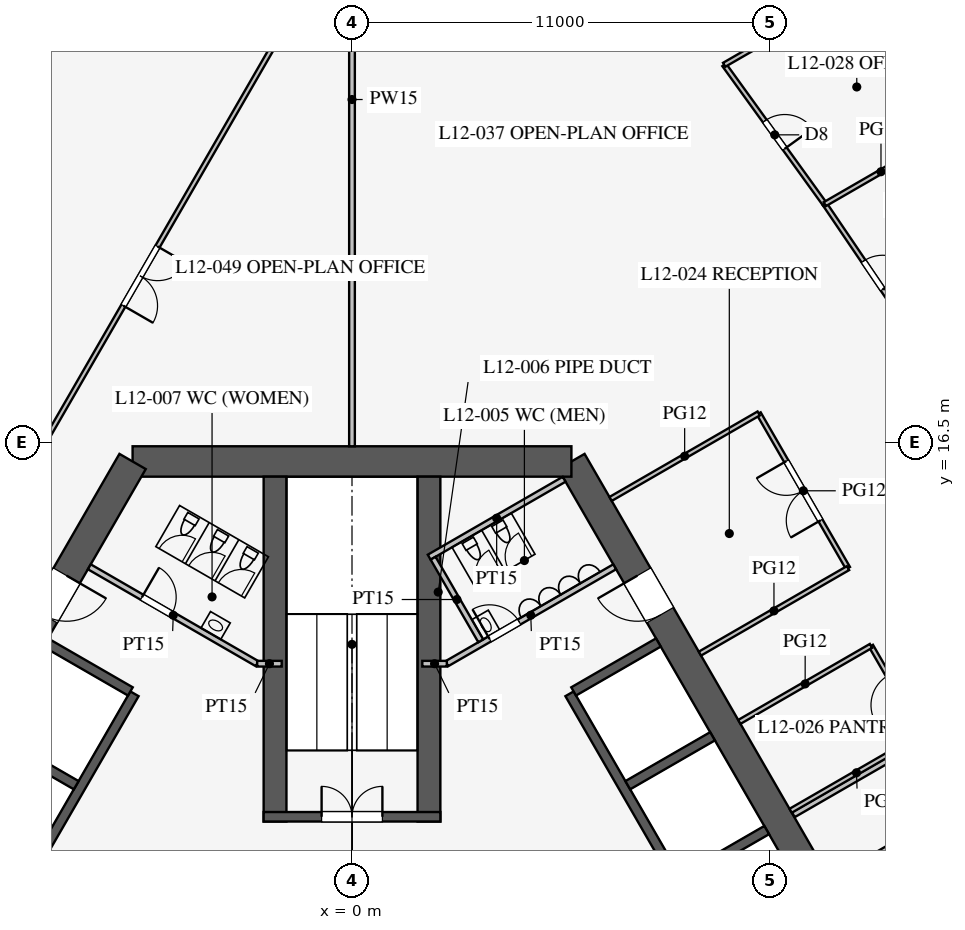
"""IFC4 building model, lengths in metres.
Left out: names, types, materials, properties, quantities, classifications, styles, units other than length and angle.
Written with IfcOpenShell. Run it as: python <this file> out.ifc"""

import sys

from ifc_helpers import new_model, si_unit, direction, frame, frame_2d, origin, place, context, subcontext, project, spatial, rectangle, extrude, element, fill, save


model = new_model("IFC4")
c1 = context("Model", 3, precision=1e-05, world=origin(), true_north=direction((0.0, 1.0)))
c2 = subcontext(c1, "Body", "Model", "MODEL_VIEW")
j1 = project(units=[si_unit("LENGTHUNIT", "METRE"), si_unit("PLANEANGLEUNIT", "RADIAN")], contexts=[c1])
p1 = place(None, origin())
s1 = spatial("IfcSite", under=j1, at=p1, CompositionType="ELEMENT")
p2 = place(p1, origin())
s2 = spatial("IfcBuilding", under=s1, at=p2, CompositionType="ELEMENT")
p3 = place(p2, frame((0.0, 0.0, 54.3)))
s3 = spatial("IfcBuildingStorey", under=s2, at=p3, CompositionType="ELEMENT", Elevation=54.3)
p4 = place(p3, frame((16.743, -3.0, 0.0), z_axis=(0.0, 0.0, 1.0), x_axis=(-0.500002442456, 0.866023993627, 0.0)))
e1 = element("IfcWall", 1, at=p4, inside=s3, PredefinedType="SHEAR", context=c2, shape_type="SweptSolid", body=[
    extrude(rectangle(XDim=21.939, YDim=0.8, at=frame_2d((10.97, 0.0))), origin(), (0.0, 0.0, 1.0), 4.2),
])
p5 = place(p4, frame((17.27, 0.0, 0.0)))
e2 = element("IfcOpeningElement", 2, at=p5, cuts=e1, PredefinedType="OPENING", context=c2, shape_type="SweptSolid", body=[
    extrude(rectangle(XDim=1.2, YDim=2.1, at=frame_2d((0.6, 1.05))), frame((0.0, 0.41, 0.0), z_axis=(0.0, -1.0, 0.0), x_axis=(1.0, 0.0, 0.0)), (0.0, 0.0, 1.0), 0.82),
])
p6 = place(p4, frame((3.47, 0.0, 0.0)))
e3 = element("IfcOpeningElement", 3, at=p6, cuts=e1, PredefinedType="OPENING", context=c2, shape_type="SweptSolid", body=[
    extrude(rectangle(XDim=1.2, YDim=2.1, at=frame_2d((0.6, 1.05))), frame((0.0, 0.41, 0.0), z_axis=(0.0, -1.0, 0.0), x_axis=(1.0, 0.0, 0.0)), (0.0, 0.0, 1.0), 0.82),
])
p7 = place(p3, frame((5.773, 16.0, 0.0), z_axis=(0.0, 0.0, 1.0), x_axis=(-1.0, 0.0, 0.0)))
e4 = element("IfcWall", 4, at=p7, inside=s3, PredefinedType="SHEAR", context=c2, shape_type="SweptSolid", body=[
    extrude(rectangle(XDim=11.547, YDim=0.8, at=frame_2d((5.773, 0.0))), origin(), (0.0, 0.0, 1.0), 4.2),
])
p8 = place(p3, frame((-5.773, 16.0, 0.0), z_axis=(0.0, 0.0, 1.0), x_axis=(-0.500002442456, -0.866023993627, 0.0)))
e5 = element("IfcWall", 5, at=p8, inside=s3, PredefinedType="SHEAR", context=c2, shape_type="SweptSolid", body=[
    extrude(rectangle(XDim=21.939, YDim=0.8, at=frame_2d((10.97, 0.0))), origin(), (0.0, 0.0, 1.0), 4.2),
])
p9 = place(p8, frame((17.27, 0.0, 0.0)))
e6 = element("IfcOpeningElement", 6, at=p9, cuts=e5, PredefinedType="OPENING", context=c2, shape_type="SweptSolid", body=[
    extrude(rectangle(XDim=1.2, YDim=2.1, at=frame_2d((0.6, 1.05))), frame((0.0, 0.41, 0.0), z_axis=(0.0, -1.0, 0.0), x_axis=(1.0, 0.0, 0.0)), (0.0, 0.0, 1.0), 0.82),
])
p10 = place(p8, frame((3.47, 0.0, 0.0)))
e7 = element("IfcOpeningElement", 7, at=p10, cuts=e5, PredefinedType="OPENING", context=c2, shape_type="SweptSolid", body=[
    extrude(rectangle(XDim=1.2, YDim=2.1, at=frame_2d((0.6, 1.05))), frame((0.0, 0.41, 0.0), z_axis=(0.0, -1.0, 0.0), x_axis=(1.0, 0.0, 0.0)), (0.0, 0.0, 1.0), 0.82),
])
p11 = place(p3, frame((11.424, 0.014, 0.0), z_axis=(0.0, 0.0, 1.0), x_axis=(-0.500001763848, 0.866024385424, 0.0)))
e8 = element("IfcWall", 8, at=p11, inside=s3, PredefinedType="SHEAR", context=c2, shape_type="SweptSolid", body=[
    extrude(rectangle(XDim=11.4, YDim=0.25, at=frame_2d((5.7, 0.0))), origin(), (0.0, 0.0, 1.0), 4.2),
])
for number, where, z_axis, x_axis in (
    (9, (8.682, 5.012, 0.0), (0.0, 0.0, 1.0), (0.866, 0.5, 0.0)),
    (10, (7.257, 7.481, 0.0), (0.0, 0.0, 1.0), (0.866, 0.5, 0.0)),
):
    element("IfcWall", number, at=place(p3, frame(where, z_axis=z_axis, x_axis=x_axis)), inside=s3, PredefinedType="SHEAR", context=c2, shape_type="SweptSolid", body=[
        extrude(rectangle(XDim=2.575, YDim=0.25, at=frame_2d((1.288, 0.0))), origin(), (0.0, 0.0, 1.0), 4.2),
    ])
p12 = place(p3, frame((5.832, 9.949, 0.0), z_axis=(0.0, 0.0, 1.0), x_axis=(0.866029291668, 0.499993265928, 0.0)))
e11 = element("IfcWall", 11, at=p12, inside=s3, PredefinedType="SHEAR", context=c2, shape_type="SweptSolid", body=[
    extrude(rectangle(XDim=2.575, YDim=0.25, at=frame_2d((1.288, 0.0))), origin(), (0.0, 0.0, 1.0), 4.2),
])
p13 = place(p3, frame((-5.724, 9.886, 0.0), z_axis=(0.0, 0.0, 1.0), x_axis=(-0.500001763848, -0.866024385424, 0.0)))
e12 = element("IfcWall", 12, at=p13, inside=s3, PredefinedType="SHEAR", context=c2, shape_type="SweptSolid", body=[
    extrude(rectangle(XDim=11.4, YDim=0.25, at=frame_2d((5.7, 0.0))), origin(), (0.0, 0.0, 1.0), 4.2),
])
p14 = place(p13, frame((6.525, 0.0, 0.0)))
e13 = element("IfcOpeningElement", 13, at=p14, cuts=e12, PredefinedType="OPENING", context=c2, shape_type="SweptSolid", body=[
    extrude(rectangle(XDim=1.2, YDim=2.2, at=frame_2d((0.6, 1.1))), frame((0.0, 0.135, 0.0), z_axis=(0.0, -1.0, 0.0), x_axis=(1.0, 0.0, 0.0)), (0.0, 0.0, 1.0), 0.27),
])
p15 = place(p13, frame((9.375, 0.0, 0.0)))
e14 = element("IfcOpeningElement", 14, at=p15, cuts=e12, PredefinedType="OPENING", context=c2, shape_type="SweptSolid", body=[
    extrude(rectangle(XDim=1.2, YDim=2.2, at=frame_2d((0.6, 1.1))), frame((0.0, 0.135, 0.0), z_axis=(0.0, -1.0, 0.0), x_axis=(1.0, 0.0, 0.0)), (0.0, 0.0, 1.0), 0.27),
])
p16 = place(p3, frame((-5.832, 9.949, 0.0), z_axis=(0.0, 0.0, 1.0), x_axis=(-0.866029291668, 0.499993265928, 0.0)))
e15 = element("IfcWall", 15, at=p16, inside=s3, PredefinedType="SHEAR", context=c2, shape_type="SweptSolid", body=[
    extrude(rectangle(XDim=2.575, YDim=0.25, at=frame_2d((1.288, 0.0))), origin(), (0.0, 0.0, 1.0), 4.2),
])
p17 = place(p3, frame((-7.257, 7.481, 0.0), z_axis=(0.0, 0.0, 1.0), x_axis=(-0.866046643894, 0.499963209246, 0.0)))
e16 = element("IfcWall", 16, at=p17, inside=s3, PredefinedType="SHEAR", context=c2, shape_type="SweptSolid", body=[
    extrude(rectangle(XDim=2.575, YDim=0.25, at=frame_2d((1.288, 0.0))), origin(), (0.0, 0.0, 1.0), 4.2),
])
for number, where, z_axis, x_axis in (
    (17, (2.025, 6.525, 0.0), (0.0, 0.0, 1.0), (0.0, 1.0, 0.0)),
    (18, (-2.025, 6.525, 0.0), (0.0, 0.0, 1.0), (0.0, 1.0, 0.0)),
):
    element("IfcWall", number, at=place(p3, frame(where, z_axis=z_axis, x_axis=x_axis)), inside=s3, PredefinedType="SHEAR", context=c2, shape_type="SweptSolid", body=[
        extrude(rectangle(XDim=9.075, YDim=0.6, at=frame_2d((4.538, 0.0))), origin(), (0.0, 0.0, 1.0), 4.2),
    ])
p18 = place(p3, frame((2.325, 6.65, 0.0), z_axis=(0.0, 0.0, 1.0), x_axis=(-1.0, 0.0, 0.0)))
e19 = element("IfcWall", 19, at=p18, inside=s3, PredefinedType="SHEAR", context=c2, shape_type="SweptSolid", body=[
    extrude(rectangle(XDim=4.65, YDim=0.25, at=frame_2d((2.325, 0.0))), origin(), (0.0, 0.0, 1.0), 4.2),
])
p19 = place(p18, frame((1.525, 0.0, 0.0)))
e20 = element("IfcOpeningElement", 20, at=p19, cuts=e19, PredefinedType="OPENING", context=c2, shape_type="SweptSolid", body=[
    extrude(rectangle(XDim=1.6, YDim=2.1, at=frame_2d((0.8, 1.05))), frame((0.0, 0.135, 0.0), z_axis=(0.0, -1.0, 0.0), x_axis=(1.0, 0.0, 0.0)), (0.0, 0.0, 1.0), 0.27),
])
p20 = place(p3, frame((2.495, 10.678, 0.0), z_axis=(0.0, 0.0, 1.0), x_axis=(0.86602216432, 0.500005610874, 0.0)))
e21 = element("IfcWall", 21, at=p20, inside=s3, PredefinedType="PARTITIONING", context=c2, shape_type="SweptSolid", body=[
    extrude(rectangle(XDim=5.1, YDim=0.15, at=frame_2d((2.55, 0.0))), origin(), (0.0, 0.0, 1.0), 4.0),
])
p21 = place(p20, frame((1.3, 0.0, 0.0)))
e22 = element("IfcOpeningElement", 22, at=p21, cuts=e21, PredefinedType="OPENING", context=c2, shape_type="SweptSolid", body=[
    extrude(rectangle(XDim=0.9, YDim=2.1, at=frame_2d((0.45, 1.05))), frame((0.0, 0.085, 0.0), z_axis=(0.0, -1.0, 0.0), x_axis=(1.0, 0.0, 0.0)), (0.0, 0.0, 1.0), 0.17),
])
p22 = place(p3, frame((-2.495, 10.678, 0.0), z_axis=(0.0, 0.0, 1.0), x_axis=(-0.86602216432, 0.500005610874, 0.0)))
e23 = element("IfcWall", 23, at=p22, inside=s3, PredefinedType="PARTITIONING", context=c2, shape_type="SweptSolid", body=[
    extrude(rectangle(XDim=5.1, YDim=0.15, at=frame_2d((2.55, 0.0))), origin(), (0.0, 0.0, 1.0), 4.0),
])
p23 = place(p22, frame((2.6, 0.0, 0.0)))
e24 = element("IfcOpeningElement", 24, at=p23, cuts=e23, PredefinedType="OPENING", context=c2, shape_type="SweptSolid", body=[
    extrude(rectangle(XDim=0.9, YDim=2.1, at=frame_2d((0.45, 1.05))), frame((0.0, 0.085, 0.0), z_axis=(0.0, -1.0, 0.0), x_axis=(1.0, 0.0, 0.0)), (0.0, 0.0, 1.0), 0.17),
])
for number, where, z_axis, x_axis in (
    (25, (2.495, 10.678, 0.0), (0.0, 0.0, 1.0), (-1.0, 0.0, 0.0)),
    (26, (-2.495, 10.678, 0.0), (0.0, 0.0, 1.0), (1.0, 0.0, 0.0)),
):
    element("IfcWall", number, at=place(p3, frame(where, z_axis=z_axis, x_axis=x_axis)), inside=s3, PredefinedType="PARTITIONING", context=c2, shape_type="SweptSolid", body=[
        extrude(rectangle(XDim=0.645, YDim=0.15, at=frame_2d((0.323, 0.0))), origin(), (0.0, 0.0, 1.0), 4.0),
    ])
p24 = place(p3, frame((2.031, 13.482, 0.0), z_axis=(0.0, 0.0, 1.0), x_axis=(0.866050731258, 0.499956128963, 0.0)))
e27 = element("IfcWall", 27, at=p24, inside=s3, PredefinedType="PARTITIONING", context=c2, shape_type="SweptSolid", body=[
    extrude(rectangle(XDim=4.1, YDim=0.15, at=frame_2d((2.05, 0.0))), origin(), (0.0, 0.0, 1.0), 4.0),
])
p25 = place(p3, frame((3.389, 11.281, 0.0), z_axis=(0.0, 0.0, 1.0), x_axis=(-0.499989096993, 0.866031698547, 0.0)))
e28 = element("IfcWall", 28, at=p25, inside=s3, PredefinedType="PARTITIONING", context=c2, shape_type="SweptSolid", body=[
    extrude(rectangle(XDim=2.51, YDim=0.15, at=frame_2d((1.255, 0.0))), origin(), (0.0, 0.0, 1.0), 4.0),
])
p26 = place(p3, frame((0.0, 16.4, 0.0), z_axis=(0.0, 0.0, 1.0), x_axis=(0.0, 1.0, 0.0)))
e29 = element("IfcWall", 29, at=p26, inside=s3, PredefinedType="PARTITIONING", context=c2, shape_type="SweptSolid", body=[
    extrude(rectangle(XDim=18.25, YDim=0.15, at=frame_2d((9.125, 0.0))), origin(), (0.0, 0.0, 1.0), 2.3),
])
p27 = place(p3, frame((11.613, 6.705, 0.0), z_axis=(0.0, 0.0, 1.0), x_axis=(0.86602785495, 0.499995754432, 0.0)))
e30 = element("IfcWall", 30, at=p27, inside=s3, PredefinedType="PARTITIONING", context=c2, shape_type="SweptSolid", body=[
    extrude(rectangle(XDim=12.759, YDim=0.15, at=frame_2d((6.379, 0.0))), origin(), (0.0, 0.0, 1.0), 3.2),
])
p28 = place(p3, frame((15.006, 8.808, 0.0), z_axis=(0.0, 0.0, 1.0), x_axis=(-0.500048589285, 0.86599734893, 0.0)))
e31 = element("IfcWall", 31, at=p28, inside=s3, PredefinedType="PARTITIONING", context=c2, shape_type="SweptSolid", body=[
    extrude(rectangle(XDim=2.7, YDim=0.12, at=frame_2d((1.35, 0.0))), origin(), (0.0, 0.0, 1.0), 2.9),
])
p29 = place(p28, frame((0.9, 0.0, 0.15)))
e32 = element("IfcOpeningElement", 32, at=p29, cuts=e31, PredefinedType="OPENING", context=c2, shape_type="SweptSolid", body=[
    extrude(rectangle(XDim=0.9, YDim=2.1, at=frame_2d((0.45, 1.05))), frame((0.0, 0.07, 0.0), z_axis=(0.0, -1.0, 0.0), x_axis=(1.0, 0.0, 0.0)), (0.0, 0.0, 1.0), 0.14),
])
p30 = place(p3, frame((13.052, 13.194, 0.0), z_axis=(0.0, 0.0, 1.0), x_axis=(-0.499977259774, 0.866038532462, 0.0)))
e33 = element("IfcWall", 33, at=p30, inside=s3, PredefinedType="PARTITIONING", context=c2, shape_type="SweptSolid", body=[
    extrude(rectangle(XDim=4.7, YDim=0.12, at=frame_2d((2.35, 0.0))), origin(), (0.0, 0.0, 1.0), 2.9),
])
p31 = place(p30, frame((1.45, 0.0, 0.15)))
e34 = element("IfcOpeningElement", 34, at=p31, cuts=e33, PredefinedType="OPENING", context=c2, shape_type="SweptSolid", body=[
    extrude(rectangle(XDim=1.8, YDim=2.1, at=frame_2d((0.9, 1.05))), frame((0.0, 0.07, 0.0), z_axis=(0.0, -1.0, 0.0), x_axis=(1.0, 0.0, 0.0)), (0.0, 0.0, 1.0), 0.14),
])
for number, where, z_axis, x_axis in (
    (35, (11.542, 6.808, 0.0), (0.0, 0.0, 1.0), (0.866, 0.5, 0.0)),
    (36, (10.192, 9.146, 0.0), (0.0, 0.0, 1.0), (0.866, 0.5, 0.0)),
):
    element("IfcWall", number, at=place(p3, frame(where, z_axis=z_axis, x_axis=x_axis)), inside=s3, PredefinedType="PARTITIONING", context=c2, shape_type="SweptSolid", body=[
        extrude(rectangle(XDim=4.0, YDim=0.12, at=frame_2d((2.0, 0.0))), origin(), (0.0, 0.0, 1.0), 2.9),
    ])
p32 = place(p3, frame((9.155, 10.944, 0.0), z_axis=(0.0, 0.0, 1.0), x_axis=(0.866017533419, 0.500013631625, 0.0)))
e37 = element("IfcWall", 37, at=p32, inside=s3, PredefinedType="PARTITIONING", context=c2, shape_type="SweptSolid", body=[
    extrude(rectangle(XDim=4.5, YDim=0.12, at=frame_2d((2.25, 0.0))), origin(), (0.0, 0.0, 1.0), 2.9),
])
p33 = place(p3, frame((6.805, 15.014, 0.0), z_axis=(0.0, 0.0, 1.0), x_axis=(0.866031096941, 0.499990139034, 0.0)))
e38 = element("IfcWall", 38, at=p33, inside=s3, PredefinedType="PARTITIONING", context=c2, shape_type="SweptSolid", body=[
    extrude(rectangle(XDim=4.5, YDim=0.12, at=frame_2d((2.25, 0.0))), origin(), (0.0, 0.0, 1.0), 2.9),
])
p34 = place(p3, frame((12.605, 4.968, 0.0), z_axis=(0.0, 0.0, 1.0), x_axis=(0.866026010844, 0.49999894854, 0.0)))
e39 = element("IfcWall", 39, at=p34, inside=s3, PredefinedType="PARTITIONING", context=c2, shape_type="SweptSolid", body=[
    extrude(rectangle(XDim=4.0, YDim=0.12, at=frame_2d((2.0, 0.0))), origin(), (0.0, 0.0, 1.0), 2.9),
])
p35 = place(p3, frame((12.441, 22.771, 0.0), z_axis=(0.0, 0.0, 1.0), x_axis=(-0.585376255171, 0.810761765183, 0.0)))
e40 = element("IfcWall", 40, at=p35, inside=s3, PredefinedType="PARTITIONING", context=c2, shape_type="SweptSolid", body=[
    extrude(rectangle(XDim=4.523, YDim=0.12, at=frame_2d((2.262, 0.0))), origin(), (0.0, 0.0, 1.0), 2.9),
])
p36 = place(p35, frame((1.8, 0.0, 0.15)))
e41 = element("IfcOpeningElement", 41, at=p36, cuts=e40, PredefinedType="OPENING", context=c2, shape_type="SweptSolid", body=[
    extrude(rectangle(XDim=0.9, YDim=2.1, at=frame_2d((0.45, 1.05))), frame((0.0, 0.07, 0.0), z_axis=(0.0, -1.0, 0.0), x_axis=(1.0, 0.0, 0.0)), (0.0, 0.0, 1.0), 0.14),
])
p37 = place(p3, frame((14.975, 19.038, 0.0), z_axis=(0.0, 0.0, 1.0), x_axis=(-0.561512004239, 0.827468591002, 0.0)))
e42 = element("IfcWall", 42, at=p37, inside=s3, PredefinedType="PARTITIONING", context=c2, shape_type="SweptSolid", body=[
    extrude(rectangle(XDim=4.512, YDim=0.12, at=frame_2d((2.256, 0.0))), origin(), (0.0, 0.0, 1.0), 2.9),
])
p38 = place(p37, frame((1.8, 0.0, 0.15)))
e43 = element("IfcOpeningElement", 43, at=p38, cuts=e42, PredefinedType="OPENING", context=c2, shape_type="SweptSolid", body=[
    extrude(rectangle(XDim=0.9, YDim=2.1, at=frame_2d((0.45, 1.05))), frame((0.0, 0.07, 0.0), z_axis=(0.0, -1.0, 0.0), x_axis=(1.0, 0.0, 0.0)), (0.0, 0.0, 1.0), 0.14),
])
p39 = place(p3, frame((12.441, 22.771, 0.0), z_axis=(0.0, 0.0, 1.0), x_axis=(0.866016478054, 0.500015459501, 0.0)))
e44 = element("IfcWall", 44, at=p39, inside=s3, PredefinedType="PARTITIONING", context=c2, shape_type="SweptSolid", body=[
    extrude(rectangle(XDim=3.414, YDim=0.12, at=frame_2d((1.707, 0.0))), origin(), (0.0, 0.0, 1.0), 2.9),
])
p40 = place(p3, frame((9.793, 26.439, 0.0), z_axis=(0.0, 0.0, 1.0), x_axis=(0.866040105854, 0.499974534403, 0.0)))
e45 = element("IfcWall", 45, at=p40, inside=s3, PredefinedType="PARTITIONING", context=c2, shape_type="SweptSolid", body=[
    extrude(rectangle(XDim=3.409, YDim=0.12, at=frame_2d((1.705, 0.0))), origin(), (0.0, 0.0, 1.0), 2.9),
])
p41 = place(p3, frame((-0.016, 30.491, 0.0), z_axis=(0.0, 0.0, 1.0), x_axis=(-0.50000091641, -0.866024874695, 0.0)))
e46 = element("IfcWall", 46, at=p41, inside=s3, PredefinedType="PARTITIONING", context=c2, shape_type="SweptSolid", body=[
    extrude(rectangle(XDim=52.796, YDim=0.12, at=frame_2d((26.398, 0.0))), origin(), (0.0, 0.0, 1.0), 2.9),
])
p42 = place(p41, frame((10.2, 0.0, 0.15)))
e47 = element("IfcOpeningElement", 47, at=p42, cuts=e46, PredefinedType="OPENING", context=c2, shape_type="SweptSolid", body=[
    extrude(rectangle(XDim=1.8, YDim=2.1, at=frame_2d((0.9, 1.05))), frame((0.0, 0.07, 0.0), z_axis=(0.0, -1.0, 0.0), x_axis=(1.0, 0.0, 0.0)), (0.0, 0.0, 1.0), 0.14),
])
p43 = place(p41, frame((40.8, 0.0, 0.15)))
e48 = element("IfcOpeningElement", 48, at=p43, cuts=e46, PredefinedType="OPENING", context=c2, shape_type="SweptSolid", body=[
    extrude(rectangle(XDim=1.8, YDim=2.1, at=frame_2d((0.9, 1.05))), frame((0.0, 0.07, 0.0), z_axis=(0.0, -1.0, 0.0), x_axis=(1.0, 0.0, 0.0)), (0.0, 0.0, 1.0), 0.14),
])
p44 = place(p21, origin())
e49 = element("IfcDoor", 49, at=p44, inside=s3, OperationType="SINGLE_SWING_LEFT", PredefinedType="DOOR", context=c2, shape_type="SweptSolid", body=[
    extrude(rectangle(XDim=0.9, YDim=2.1, at=frame_2d((0.45, 1.05))), frame((0.0, 0.025, 0.0), z_axis=(0.0, -1.0, 0.0), x_axis=(1.0, 0.0, 0.0)), (0.0, 0.0, 1.0), 0.05),
])
fill(e22, e49)
p45 = place(p23, frame((0.9, 0.0, 0.0), z_axis=(0.0, 0.0, 1.0), x_axis=(-1.0, 0.0, 0.0)))
e50 = element("IfcDoor", 50, at=p45, inside=s3, OperationType="SINGLE_SWING_LEFT", PredefinedType="DOOR", context=c2, shape_type="SweptSolid", body=[
    extrude(rectangle(XDim=0.9, YDim=2.1, at=frame_2d((0.45, 1.05))), frame((0.0, 0.025, 0.0), z_axis=(0.0, -1.0, 0.0), x_axis=(1.0, 0.0, 0.0)), (0.0, 0.0, 1.0), 0.05),
])
fill(e24, e50)
p46 = place(p19, frame((1.6, 0.0, 0.0), z_axis=(0.0, 0.0, 1.0), x_axis=(-1.0, 0.0, 0.0)))
e51 = element("IfcDoor", 51, at=p46, inside=s3, OperationType="DOUBLE_DOOR_SINGLE_SWING", PredefinedType="DOOR", context=c2, shape_type="SweptSolid", body=[
    extrude(rectangle(XDim=1.6, YDim=2.1, at=frame_2d((0.8, 1.05))), frame((0.0, 0.025, 0.0), z_axis=(0.0, -1.0, 0.0), x_axis=(1.0, 0.0, 0.0)), (0.0, 0.0, 1.0), 0.05),
])
fill(e20, e51)
p47 = place(p5, origin())
e52 = element("IfcDoor", 52, at=p47, inside=s3, OperationType="SINGLE_SWING_RIGHT", PredefinedType="DOOR", context=c2, shape_type="SweptSolid", body=[
    extrude(rectangle(XDim=1.2, YDim=2.1, at=frame_2d((0.6, 1.05))), frame((0.0, 0.025, 0.0), z_axis=(0.0, -1.0, 0.0), x_axis=(1.0, 0.0, 0.0)), (0.0, 0.0, 1.0), 0.05),
])
fill(e2, e52)
p48 = place(p10, origin())
e53 = element("IfcDoor", 53, at=p48, inside=s3, OperationType="SINGLE_SWING_LEFT", PredefinedType="DOOR", context=c2, shape_type="SweptSolid", body=[
    extrude(rectangle(XDim=1.2, YDim=2.1, at=frame_2d((0.6, 1.05))), frame((0.0, 0.025, 0.0), z_axis=(0.0, -1.0, 0.0), x_axis=(1.0, 0.0, 0.0)), (0.0, 0.0, 1.0), 0.05),
])
fill(e7, e53)
p49 = place(p31, origin())
e54 = element("IfcDoor", 54, at=p49, inside=s3, OperationType="DOUBLE_DOOR_SINGLE_SWING", PredefinedType="DOOR", context=c2, shape_type="SweptSolid", body=[
    extrude(rectangle(XDim=1.8, YDim=2.1, at=frame_2d((0.9, 1.05))), frame((0.0, 0.025, 0.0), z_axis=(0.0, -1.0, 0.0), x_axis=(1.0, 0.0, 0.0)), (0.0, 0.0, 1.0), 0.05),
])
fill(e34, e54)
p50 = place(p36, frame((0.9, 0.0, 0.0), z_axis=(0.0, 0.0, 1.0), x_axis=(-1.0, 0.0, 0.0)))
e55 = element("IfcDoor", 55, at=p50, inside=s3, OperationType="SINGLE_SWING_RIGHT", PredefinedType="DOOR", context=c2, shape_type="SweptSolid", body=[
    extrude(rectangle(XDim=0.9, YDim=2.1, at=frame_2d((0.45, 1.05))), frame((0.0, 0.025, 0.0), z_axis=(0.0, -1.0, 0.0), x_axis=(1.0, 0.0, 0.0)), (0.0, 0.0, 1.0), 0.05),
])
fill(e41, e55)
p51 = place(p38, frame((0.9, 0.0, 0.0), z_axis=(0.0, 0.0, 1.0), x_axis=(-1.0, 0.0, 0.0)))
e56 = element("IfcDoor", 56, at=p51, inside=s3, OperationType="SINGLE_SWING_RIGHT", PredefinedType="DOOR", context=c2, shape_type="SweptSolid", body=[
    extrude(rectangle(XDim=0.9, YDim=2.1, at=frame_2d((0.45, 1.05))), frame((0.0, 0.025, 0.0), z_axis=(0.0, -1.0, 0.0), x_axis=(1.0, 0.0, 0.0)), (0.0, 0.0, 1.0), 0.05),
])
fill(e43, e56)
p52 = place(p42, origin())
e57 = element("IfcDoor", 57, at=p52, inside=s3, OperationType="DOUBLE_DOOR_SINGLE_SWING", PredefinedType="DOOR", context=c2, shape_type="SweptSolid", body=[
    extrude(rectangle(XDim=1.8, YDim=2.1, at=frame_2d((0.9, 1.05))), frame((0.0, 0.025, 0.0), z_axis=(0.0, -1.0, 0.0), x_axis=(1.0, 0.0, 0.0)), (0.0, 0.0, 1.0), 0.05),
])
fill(e47, e57)
save(model, sys.argv[1])
